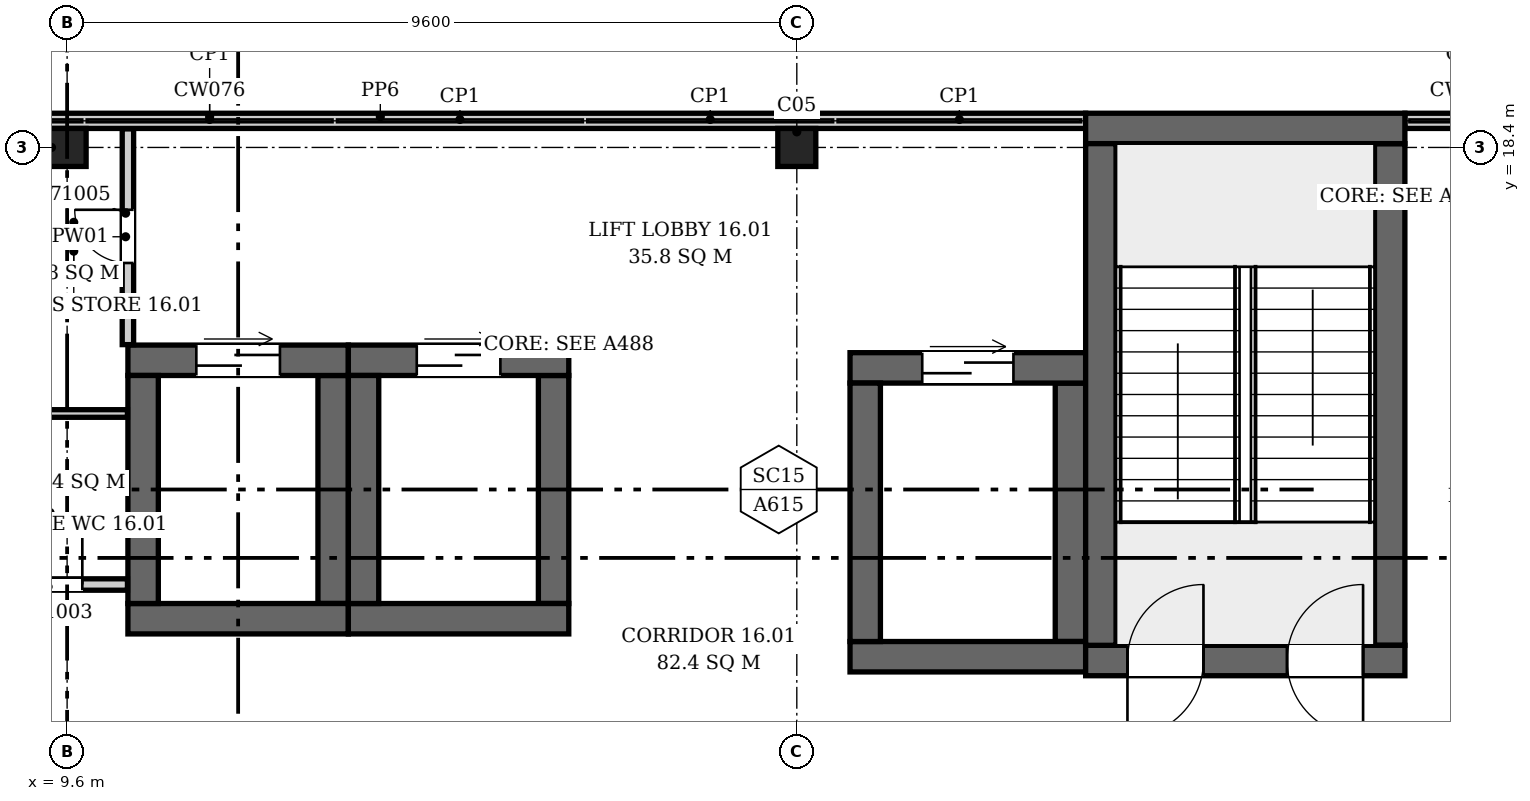
"""IFC4 building model, lengths in metres.
Left out: names, types, materials, properties, quantities, classifications, styles, units other than length and angle.
Written with IfcOpenShell. Run it as: python <this file> out.ifc"""

import sys

from ifc_helpers import new_model, si_unit, direction, frame, frame_2d, origin, origin_2d, place, context, subcontext, project, spatial, rectangle, extrude, element, fill, save


model = new_model("IFC4")
c1 = context("Model", 3, precision=1e-05, world=origin(), true_north=direction((0.0, 1.0)))
c2 = subcontext(c1, "Body", "Model", "MODEL_VIEW")
j1 = project(units=[si_unit("LENGTHUNIT", "METRE"), si_unit("PLANEANGLEUNIT", "RADIAN")], contexts=[c1])
p1 = place(None, origin())
s1 = spatial("IfcSite", under=j1, at=p1, CompositionType="ELEMENT")
p2 = place(p1, origin())
s2 = spatial("IfcBuilding", under=s1, at=p2, CompositionType="ELEMENT")
p3 = place(p2, frame((0.0, 0.0, 78.1)))
s3 = spatial("IfcBuildingStorey", under=s2, at=p3, CompositionType="ELEMENT", Elevation=78.1)
p4 = place(p3, frame((23.0, 11.65, 0.0), z_axis=(0.0, 0.0, 1.0), x_axis=(1.0, 0.0, 0.0)))
e1 = element("IfcWall", 1, at=p4, inside=s3, PredefinedType="SHEAR", context=c2, shape_type="SweptSolid", body=[
    extrude(rectangle(XDim=4.2, YDim=0.4, at=frame_2d((2.1, 0.0))), origin(), (0.0, 0.0, 1.0), 7.1),
])
p5 = place(p4, frame((0.55, 0.0, 0.0)))
e2 = element("IfcOpeningElement", 2, at=p5, cuts=e1, PredefinedType="OPENING", context=c2, shape_type="SweptSolid", body=[
    extrude(rectangle(XDim=1.0, YDim=2.1, at=frame_2d((0.5, 1.05))), frame((0.0, 0.21, 0.0), z_axis=(0.0, -1.0, 0.0), x_axis=(1.0, 0.0, 0.0)), (0.0, 0.0, 1.0), 0.42),
])
p6 = place(p4, frame((2.65, 0.0, 0.0)))
e3 = element("IfcOpeningElement", 3, at=p6, cuts=e1, PredefinedType="OPENING", context=c2, shape_type="SweptSolid", body=[
    extrude(rectangle(XDim=1.0, YDim=2.1, at=frame_2d((0.5, 1.05))), frame((0.0, 0.21, 0.0), z_axis=(0.0, -1.0, 0.0), x_axis=(1.0, 0.0, 0.0)), (0.0, 0.0, 1.0), 0.42),
])
p7 = place(p4, frame((0.55, 0.0, 4.2)))
e4 = element("IfcOpeningElement", 4, at=p7, cuts=e1, PredefinedType="OPENING", context=c2, shape_type="SweptSolid", body=[
    extrude(rectangle(XDim=1.0, YDim=2.1, at=frame_2d((0.5, 1.05))), frame((0.0, 0.21, 0.0), z_axis=(0.0, -1.0, 0.0), x_axis=(1.0, 0.0, 0.0)), (0.0, 0.0, 1.0), 0.42),
])
p8 = place(p4, frame((2.65, 0.0, 4.2)))
e5 = element("IfcOpeningElement", 5, at=p8, cuts=e1, PredefinedType="OPENING", context=c2, shape_type="SweptSolid", body=[
    extrude(rectangle(XDim=1.0, YDim=2.1, at=frame_2d((0.5, 1.05))), frame((0.0, 0.21, 0.0), z_axis=(0.0, -1.0, 0.0), x_axis=(1.0, 0.0, 0.0)), (0.0, 0.0, 1.0), 0.42),
])
p9 = place(p3, frame((23.0, 18.65, 0.0), z_axis=(0.0, 0.0, 1.0), x_axis=(1.0, 0.0, 0.0)))
e6 = element("IfcWall", 6, at=p9, inside=s3, PredefinedType="SHEAR", context=c2, shape_type="SweptSolid", body=[
    extrude(rectangle(XDim=4.2, YDim=0.4, at=frame_2d((2.1, 0.0))), origin(), (0.0, 0.0, 1.0), 7.1),
])
for number, where, z_axis, x_axis in (
    (7, (23.2, 11.85, 0.0), (0.0, 0.0, 1.0), (0.0, 1.0, 0.0)),
    (8, (27.0, 11.85, 0.0), (0.0, 0.0, 1.0), (0.0, 1.0, 0.0)),
):
    element("IfcWall", number, at=place(p3, frame(where, z_axis=z_axis, x_axis=x_axis)), inside=s3, PredefinedType="SHEAR", context=c2, shape_type="SweptSolid", body=[
        extrude(rectangle(XDim=6.6, YDim=0.4, at=frame_2d((3.3, 0.0))), origin(), (0.0, 0.0, 1.0), 7.1),
    ])
p10 = place(p3, frame((10.4, 12.2, 0.0), z_axis=(0.0, 0.0, 1.0), x_axis=(1.0, 0.0, 0.0)))
e9 = element("IfcWall", 9, at=p10, inside=s3, PredefinedType="SHEAR", context=c2, shape_type="SweptSolid", body=[
    extrude(rectangle(XDim=2.9, YDim=0.4, at=frame_2d((1.45, 0.0))), origin(), (0.0, 0.0, 1.0), 7.6),
])
p11 = place(p3, frame((10.4, 15.6, 0.0), z_axis=(0.0, 0.0, 1.0), x_axis=(1.0, 0.0, 0.0)))
e10 = element("IfcWall", 10, at=p11, inside=s3, PredefinedType="SHEAR", context=c2, shape_type="SweptSolid", body=[
    extrude(rectangle(XDim=2.9, YDim=0.4, at=frame_2d((1.45, 0.0))), origin(), (0.0, 0.0, 1.0), 7.6),
])
p12 = place(p11, frame((0.9, 0.0, 0.0)))
e11 = element("IfcOpeningElement", 11, at=p12, cuts=e10, PredefinedType="OPENING", context=c2, shape_type="SweptSolid", body=[
    extrude(rectangle(XDim=1.1, YDim=2.1, at=frame_2d((0.55, 1.05))), frame((0.0, 0.21, 0.0), z_axis=(0.0, -1.0, 0.0), x_axis=(1.0, 0.0, 0.0)), (0.0, 0.0, 1.0), 0.42),
])
for number, where, z_axis, x_axis in (
    (12, (10.6, 12.4, 0.0), (0.0, 0.0, 1.0), (0.0, 1.0, 0.0)),
    (13, (13.1, 12.4, 0.0), (0.0, 0.0, 1.0), (0.0, 1.0, 0.0)),
):
    element("IfcWall", number, at=place(p3, frame(where, z_axis=z_axis, x_axis=x_axis)), inside=s3, PredefinedType="SHEAR", context=c2, shape_type="SweptSolid", body=[
        extrude(rectangle(XDim=3.0, YDim=0.4, at=frame_2d((1.5, 0.0))), origin(), (0.0, 0.0, 1.0), 7.6),
    ])
p13 = place(p3, frame((13.3, 12.2, 0.0), z_axis=(0.0, 0.0, 1.0), x_axis=(1.0, 0.0, 0.0)))
e14 = element("IfcWall", 14, at=p13, inside=s3, PredefinedType="SHEAR", context=c2, shape_type="SweptSolid", body=[
    extrude(rectangle(XDim=2.9, YDim=0.4, at=frame_2d((1.45, 0.0))), origin(), (0.0, 0.0, 1.0), 7.6),
])
p14 = place(p3, frame((13.3, 15.6, 0.0), z_axis=(0.0, 0.0, 1.0), x_axis=(1.0, 0.0, 0.0)))
e15 = element("IfcWall", 15, at=p14, inside=s3, PredefinedType="SHEAR", context=c2, shape_type="SweptSolid", body=[
    extrude(rectangle(XDim=2.9, YDim=0.4, at=frame_2d((1.45, 0.0))), origin(), (0.0, 0.0, 1.0), 7.6),
])
p15 = place(p14, frame((0.9, 0.0, 0.0)))
e16 = element("IfcOpeningElement", 16, at=p15, cuts=e15, PredefinedType="OPENING", context=c2, shape_type="SweptSolid", body=[
    extrude(rectangle(XDim=1.1, YDim=2.1, at=frame_2d((0.55, 1.05))), frame((0.0, 0.21, 0.0), z_axis=(0.0, -1.0, 0.0), x_axis=(1.0, 0.0, 0.0)), (0.0, 0.0, 1.0), 0.42),
])
for number, where, z_axis, x_axis in (
    (17, (13.5, 12.4, 0.0), (0.0, 0.0, 1.0), (0.0, 1.0, 0.0)),
    (18, (16.0, 12.4, 0.0), (0.0, 0.0, 1.0), (0.0, 1.0, 0.0)),
):
    element("IfcWall", number, at=place(p3, frame(where, z_axis=z_axis, x_axis=x_axis)), inside=s3, PredefinedType="SHEAR", context=c2, shape_type="SweptSolid", body=[
        extrude(rectangle(XDim=3.0, YDim=0.4, at=frame_2d((1.5, 0.0))), origin(), (0.0, 0.0, 1.0), 7.6),
    ])
p16 = place(p3, frame((19.9, 11.7, 0.0), z_axis=(0.0, 0.0, 1.0), x_axis=(1.0, 0.0, 0.0)))
e19 = element("IfcWall", 19, at=p16, inside=s3, PredefinedType="SHEAR", context=c2, shape_type="SweptSolid", body=[
    extrude(rectangle(XDim=3.1, YDim=0.4, at=frame_2d((1.55, 0.0))), origin(), (0.0, 0.0, 1.0), 7.6),
])
p17 = place(p3, frame((19.9, 15.5, 0.0), z_axis=(0.0, 0.0, 1.0), x_axis=(1.0, 0.0, 0.0)))
e20 = element("IfcWall", 20, at=p17, inside=s3, PredefinedType="SHEAR", context=c2, shape_type="SweptSolid", body=[
    extrude(rectangle(XDim=3.1, YDim=0.4, at=frame_2d((1.55, 0.0))), origin(), (0.0, 0.0, 1.0), 7.6),
])
p18 = place(p17, frame((0.95, 0.0, 0.0)))
e21 = element("IfcOpeningElement", 21, at=p18, cuts=e20, PredefinedType="OPENING", context=c2, shape_type="SweptSolid", body=[
    extrude(rectangle(XDim=1.2, YDim=2.1, at=frame_2d((0.6, 1.05))), frame((0.0, 0.21, 0.0), z_axis=(0.0, -1.0, 0.0), x_axis=(1.0, 0.0, 0.0)), (0.0, 0.0, 1.0), 0.42),
])
for number, where, z_axis, x_axis in (
    (22, (20.1, 11.9, 0.0), (0.0, 0.0, 1.0), (0.0, 1.0, 0.0)),
    (23, (22.8, 11.9, 0.0), (0.0, 0.0, 1.0), (0.0, 1.0, 0.0)),
):
    element("IfcWall", number, at=place(p3, frame(where, z_axis=z_axis, x_axis=x_axis)), inside=s3, PredefinedType="SHEAR", context=c2, shape_type="SweptSolid", body=[
        extrude(rectangle(XDim=3.4, YDim=0.4, at=frame_2d((1.7, 0.0))), origin(), (0.0, 0.0, 1.0), 7.6),
    ])
for number, where, z_axis, x_axis in (
    (24, (9.6, 18.4, 0.0), (0.0, 0.0, 1.0), (1.0, 0.0, 0.0)),
    (25, (19.2, 18.4, 0.0), (0.0, 0.0, 1.0), (1.0, 0.0, 0.0)),
):
    element("IfcColumn", number, at=place(p3, frame(where, z_axis=z_axis, x_axis=x_axis)), inside=s3, PredefinedType="COLUMN", context=c2, shape_type="SweptSolid", body=[
        extrude(rectangle(XDim=0.5, YDim=0.5, at=origin_2d()), origin(), (0.0, 0.0, 1.0), 3.9),
    ])
p19 = place(p3, frame((23.0, 18.75, 4.2), z_axis=(0.0, 0.0, 1.0), x_axis=(-1.0, 0.0, 0.0)))
e26 = element("IfcWall", 26, at=p19, inside=s3, PredefinedType="PARAPET", context=c2, shape_type="SweptSolid", body=[
    extrude(rectangle(XDim=23.2, YDim=0.2, at=frame_2d((11.6, 0.0))), origin(), (0.0, 0.0, 1.0), 1.1),
])
p20 = place(p3, frame((28.8, 18.75, 4.2), z_axis=(0.0, 0.0, 1.0), x_axis=(-1.0, 0.0, 0.0)))
e27 = element("IfcWall", 27, at=p20, inside=s3, PredefinedType="PARAPET", context=c2, shape_type="SweptSolid", body=[
    extrude(rectangle(XDim=1.6, YDim=0.2, at=frame_2d((0.8, 0.0))), origin(), (0.0, 0.0, 1.0), 1.1),
])
p21 = place(p3, frame((6.125, 12.65, 0.0), z_axis=(0.0, 0.0, 1.0), x_axis=(1.0, 0.0, 0.0)))
e28 = element("IfcWall", 28, at=p21, inside=s3, PredefinedType="PARTITIONING", context=c2, shape_type="SweptSolid", body=[
    extrude(rectangle(XDim=4.269, YDim=0.15, at=frame_2d((2.135, 0.0))), origin(), (0.0, 0.0, 1.0), 3.9),
])
p22 = place(p21, frame((2.775, 0.0, 0.0)))
e29 = element("IfcOpeningElement", 29, at=p22, cuts=e28, PredefinedType="OPENING", context=c2, shape_type="SweptSolid", body=[
    extrude(rectangle(XDim=0.9, YDim=2.1, at=frame_2d((0.45, 1.05))), frame((0.0, 0.085, 0.0), z_axis=(0.0, -1.0, 0.0), x_axis=(1.0, 0.0, 0.0)), (0.0, 0.0, 1.0), 0.17),
])
p23 = place(p3, frame((6.275, 14.9, 0.0), z_axis=(0.0, 0.0, 1.0), x_axis=(1.0, 0.0, 0.0)))
e30 = element("IfcWall", 30, at=p23, inside=s3, PredefinedType="PARTITIONING", context=c2, shape_type="SweptSolid", body=[
    extrude(rectangle(XDim=4.119, YDim=0.1, at=frame_2d((2.06, 0.0))), origin(), (0.0, 0.0, 1.0), 3.9),
])
p24 = place(p3, frame((10.4, 15.806, 0.0), z_axis=(0.0, 0.0, 1.0), x_axis=(0.0, 1.0, 0.0)))
e31 = element("IfcWall", 31, at=p24, inside=s3, PredefinedType="PARTITIONING", context=c2, shape_type="SweptSolid", body=[
    extrude(rectangle(XDim=2.838, YDim=0.15, at=frame_2d((1.419, 0.0))), origin(), (0.0, 0.0, 1.0), 3.9),
])
p25 = place(p24, frame((1.074, 0.0, 0.0)))
e32 = element("IfcOpeningElement", 32, at=p25, cuts=e31, PredefinedType="OPENING", context=c2, shape_type="SweptSolid", body=[
    extrude(rectangle(XDim=0.7, YDim=2.1, at=frame_2d((0.35, 1.05))), frame((0.0, 0.085, 0.0), z_axis=(0.0, -1.0, 0.0), x_axis=(1.0, 0.0, 0.0)), (0.0, 0.0, 1.0), 0.17),
])
p26 = place(p5, origin())
e33 = element("IfcDoor", 33, at=p26, inside=s3, OperationType="SINGLE_SWING_RIGHT", PredefinedType="DOOR", context=c2, shape_type="SweptSolid", body=[
    extrude(rectangle(XDim=1.0, YDim=2.1, at=frame_2d((0.5, 1.05))), frame((0.0, 0.025, 0.0), z_axis=(0.0, -1.0, 0.0), x_axis=(1.0, 0.0, 0.0)), (0.0, 0.0, 1.0), 0.05),
])
fill(e2, e33)
p27 = place(p6, origin())
e34 = element("IfcDoor", 34, at=p27, inside=s3, OperationType="SINGLE_SWING_LEFT", PredefinedType="DOOR", context=c2, shape_type="SweptSolid", body=[
    extrude(rectangle(XDim=1.0, YDim=2.1, at=frame_2d((0.5, 1.05))), frame((0.0, 0.025, 0.0), z_axis=(0.0, -1.0, 0.0), x_axis=(1.0, 0.0, 0.0)), (0.0, 0.0, 1.0), 0.05),
])
fill(e3, e34)
p28 = place(p7, frame((1.0, 0.0, 0.0), z_axis=(0.0, 0.0, 1.0), x_axis=(-1.0, 0.0, 0.0)))
e35 = element("IfcDoor", 35, at=p28, inside=s3, OperationType="SINGLE_SWING_LEFT", PredefinedType="DOOR", context=c2, shape_type="SweptSolid", body=[
    extrude(rectangle(XDim=1.0, YDim=2.1, at=frame_2d((0.5, 1.05))), frame((0.0, 0.025, 0.0), z_axis=(0.0, -1.0, 0.0), x_axis=(1.0, 0.0, 0.0)), (0.0, 0.0, 1.0), 0.05),
])
fill(e4, e35)
p29 = place(p8, frame((1.0, 0.0, 0.0), z_axis=(0.0, 0.0, 1.0), x_axis=(-1.0, 0.0, 0.0)))
e36 = element("IfcDoor", 36, at=p29, inside=s3, OperationType="SINGLE_SWING_RIGHT", PredefinedType="DOOR", context=c2, shape_type="SweptSolid", body=[
    extrude(rectangle(XDim=1.0, YDim=2.1, at=frame_2d((0.5, 1.05))), frame((0.0, 0.025, 0.0), z_axis=(0.0, -1.0, 0.0), x_axis=(1.0, 0.0, 0.0)), (0.0, 0.0, 1.0), 0.05),
])
fill(e5, e36)
p30 = place(p12, origin())
e37 = element("IfcDoor", 37, at=p30, inside=s3, OperationType="DOUBLE_DOOR_SLIDING", PredefinedType="DOOR", context=c2, shape_type="SweptSolid", body=[
    extrude(rectangle(XDim=1.1, YDim=2.1, at=frame_2d((0.55, 1.05))), frame((0.0, 0.025, 0.0), z_axis=(0.0, -1.0, 0.0), x_axis=(1.0, 0.0, 0.0)), (0.0, 0.0, 1.0), 0.05),
])
fill(e11, e37)
p31 = place(p15, origin())
e38 = element("IfcDoor", 38, at=p31, inside=s3, OperationType="DOUBLE_DOOR_SLIDING", PredefinedType="DOOR", context=c2, shape_type="SweptSolid", body=[
    extrude(rectangle(XDim=1.1, YDim=2.1, at=frame_2d((0.55, 1.05))), frame((0.0, 0.025, 0.0), z_axis=(0.0, -1.0, 0.0), x_axis=(1.0, 0.0, 0.0)), (0.0, 0.0, 1.0), 0.05),
])
fill(e16, e38)
p32 = place(p18, origin())
e39 = element("IfcDoor", 39, at=p32, inside=s3, OperationType="DOUBLE_DOOR_SLIDING", PredefinedType="DOOR", context=c2, shape_type="SweptSolid", body=[
    extrude(rectangle(XDim=1.2, YDim=2.1, at=frame_2d((0.6, 1.05))), frame((0.0, 0.025, 0.0), z_axis=(0.0, -1.0, 0.0), x_axis=(1.0, 0.0, 0.0)), (0.0, 0.0, 1.0), 0.05),
])
fill(e21, e39)
p33 = place(p22, origin())
e40 = element("IfcDoor", 40, at=p33, inside=s3, OperationType="SINGLE_SWING_RIGHT", PredefinedType="DOOR", context=c2, shape_type="SweptSolid", body=[
    extrude(rectangle(XDim=0.9, YDim=2.1, at=frame_2d((0.45, 1.05))), frame((0.0, 0.025, 0.0), z_axis=(0.0, -1.0, 0.0), x_axis=(1.0, 0.0, 0.0)), (0.0, 0.0, 1.0), 0.05),
])
fill(e29, e40)
p34 = place(p25, origin())
e41 = element("IfcDoor", 41, at=p34, inside=s3, OperationType="SINGLE_SWING_LEFT", PredefinedType="DOOR", context=c2, shape_type="SweptSolid", body=[
    extrude(rectangle(XDim=0.7, YDim=2.1, at=frame_2d((0.35, 1.05))), frame((0.0, 0.025, 0.0), z_axis=(0.0, -1.0, 0.0), x_axis=(1.0, 0.0, 0.0)), (0.0, 0.0, 1.0), 0.05),
])
fill(e32, e41)
save(model, sys.argv[1])
